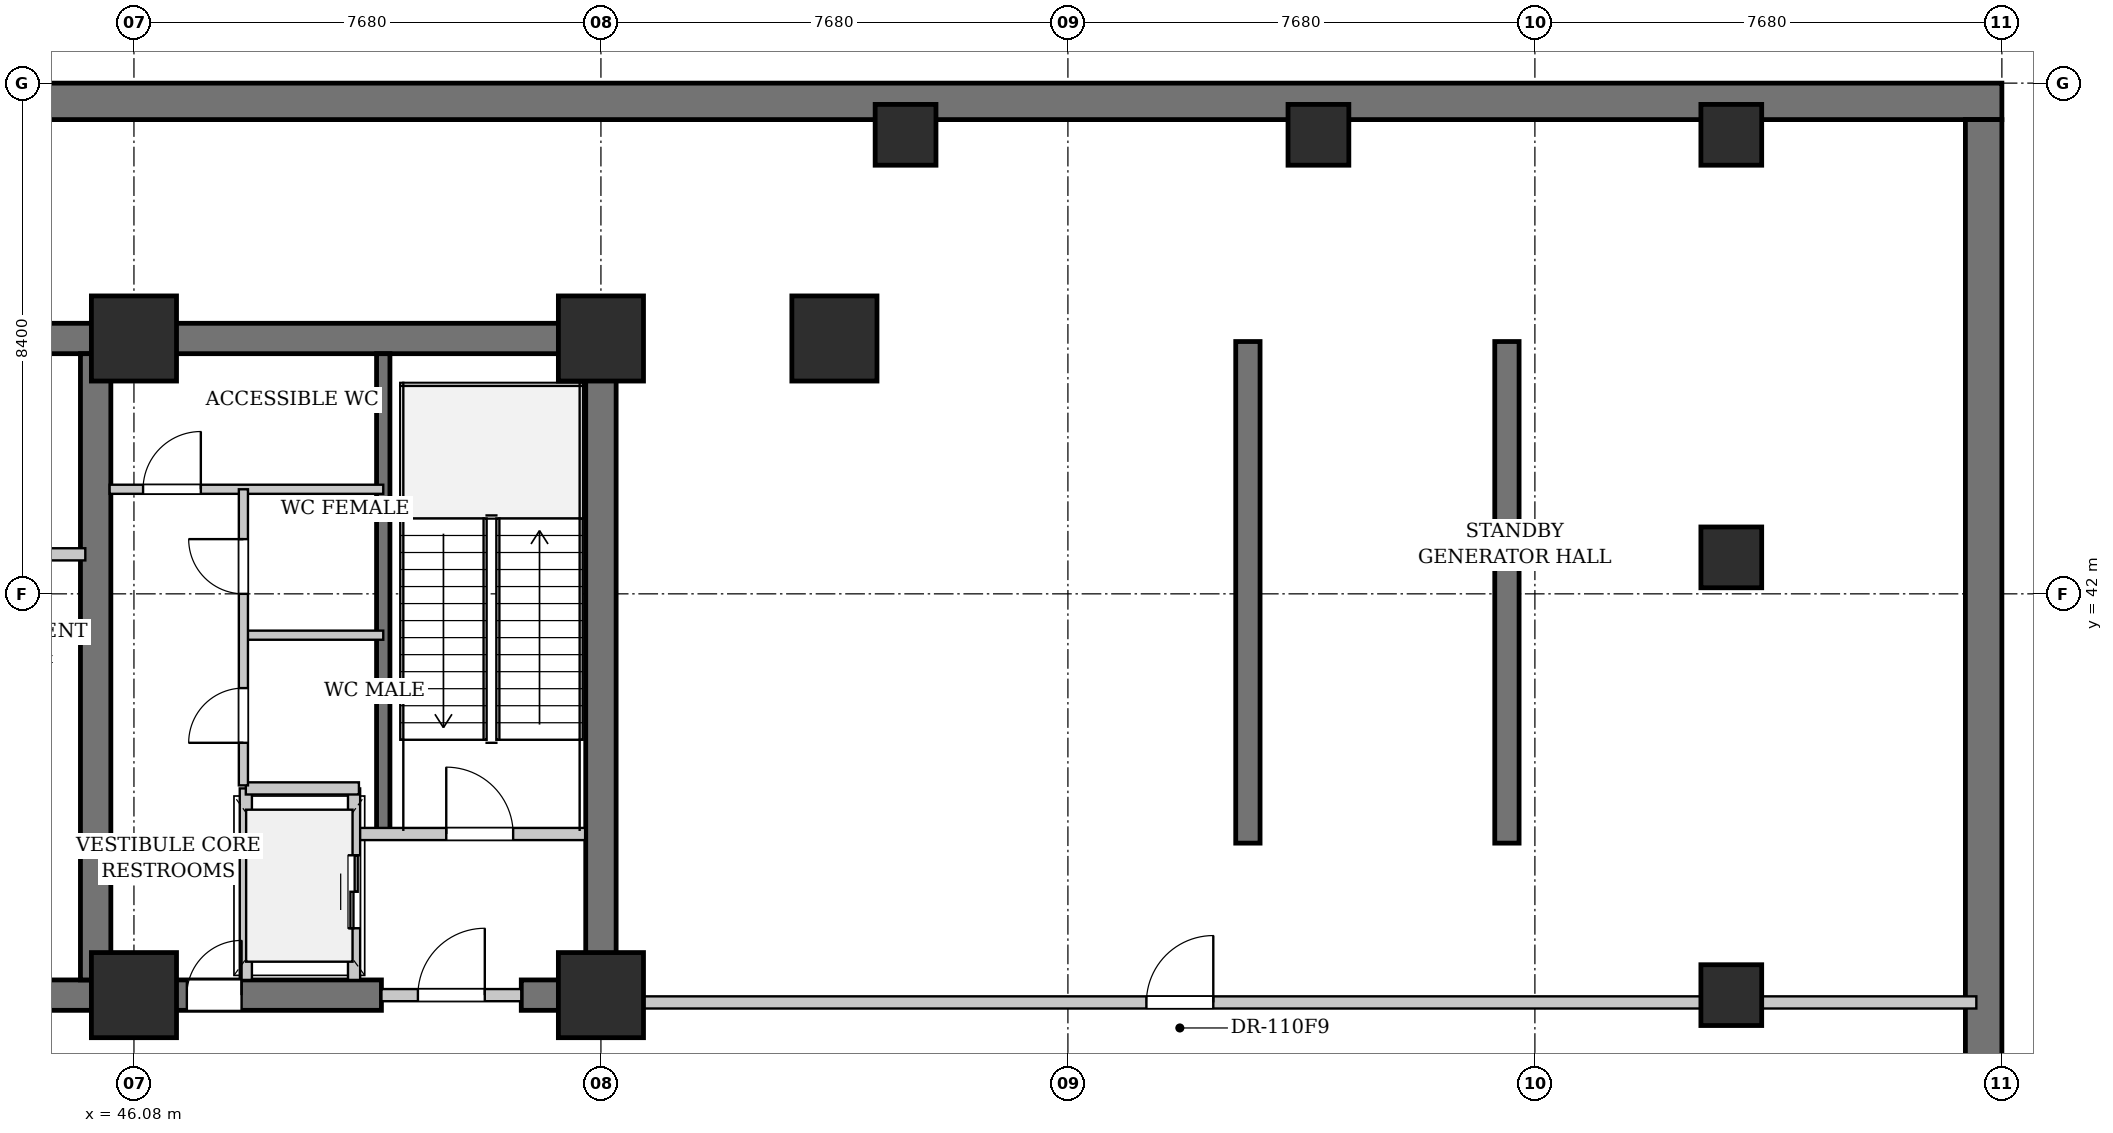
"""IFC4 building model, lengths in metres.
Left out: names, types, materials, properties, quantities, classifications, styles, units other than length and angle.
Written with IfcOpenShell. Run it as: python <this file> out.ifc"""

import sys

from ifc_helpers import new_model, si_unit, direction, frame, frame_2d, origin, origin_2d, place, context, subcontext, project, spatial, rectangle, extrude, element, fill, save


model = new_model("IFC4")
c1 = context("Model", 3, precision=1e-05, world=origin(), true_north=direction((0.0, 1.0)))
c2 = subcontext(c1, "Body", "Model", "MODEL_VIEW")
j1 = project(units=[si_unit("LENGTHUNIT", "METRE"), si_unit("PLANEANGLEUNIT", "RADIAN")], contexts=[c1])
p1 = place(None, origin())
s1 = spatial("IfcSite", under=j1, at=p1, CompositionType="ELEMENT")
p2 = place(p1, origin())
s2 = spatial("IfcBuilding", under=s1, at=p2, CompositionType="ELEMENT")
p3 = place(p2, frame((0.0, 0.0, -10.0)))
s3 = spatial("IfcBuildingStorey", under=s2, at=p3, CompositionType="ELEMENT", Elevation=-10.0)
p4 = place(p3, frame((0.0, 50.1, 0.0), z_axis=(0.0, 0.0, 1.0), x_axis=(1.0, 0.0, 0.0)))
e1 = element("IfcWall", 1, at=p4, inside=s3, PredefinedType="USERDEFINED", context=c2, shape_type="SweptSolid", body=[
    extrude(rectangle(XDim=76.8, YDim=0.6, at=frame_2d((38.4, 0.0))), origin(), (0.0, 0.0, 1.0), 4.65),
])
p5 = place(p3, frame((76.5, 0.6, 0.0), z_axis=(0.0, 0.0, 1.0), x_axis=(0.0, 1.0, 0.0)))
e2 = element("IfcWall", 2, at=p5, inside=s3, PredefinedType="USERDEFINED", context=c2, shape_type="SweptSolid", body=[
    extrude(rectangle(XDim=49.2, YDim=0.6, at=frame_2d((24.6, 0.0))), origin(), (0.0, 0.0, 1.0), 4.65),
])
p6 = place(p3, frame((22.79, 46.2, 0.0), z_axis=(0.0, 0.0, 1.0), x_axis=(1.0, 0.0, 0.0)))
e3 = element("IfcWall", 3, at=p6, inside=s3, PredefinedType="SHEAR", context=c2, shape_type="SweptSolid", body=[
    extrude(rectangle(XDim=31.22, YDim=0.5, at=frame_2d((15.61, 0.0))), origin(), (0.0, 0.0, 1.0), 4.65),
])
p7 = place(p3, frame((42.1, 35.4, 0.0), z_axis=(0.0, 0.0, 1.0), x_axis=(1.0, 0.0, 0.0)))
e4 = element("IfcWall", 4, at=p7, inside=s3, PredefinedType="SHEAR", context=c2, shape_type="SweptSolid", body=[
    extrude(rectangle(XDim=8.05, YDim=0.5, at=frame_2d((4.025, 0.0))), origin(), (0.0, 0.0, 1.0), 4.65),
])
p8 = place(p7, frame((4.85, 0.0, 0.0)))
e5 = element("IfcOpeningElement", 5, at=p8, cuts=e4, PredefinedType="OPENING", context=c2, shape_type="SweptSolid", body=[
    extrude(rectangle(XDim=0.9, YDim=2.15, at=frame_2d((0.45, 1.075))), frame((0.0, 0.26, 0.0), z_axis=(0.0, -1.0, 0.0), x_axis=(1.0, 0.0, 0.0)), (0.0, 0.0, 1.0), 0.52),
])
p9 = place(p3, frame((52.45, 35.4, 0.0), z_axis=(0.0, 0.0, 1.0), x_axis=(1.0, 0.0, 0.0)))
e6 = element("IfcWall", 6, at=p9, inside=s3, PredefinedType="SHEAR", context=c2, shape_type="SweptSolid", body=[
    extrude(rectangle(XDim=1.56, YDim=0.5, at=frame_2d((0.78, 0.0))), origin(), (0.0, 0.0, 1.0), 4.65),
])
for number, where, z_axis, x_axis in (
    (7, (45.45, 35.65, 0.0), (0.0, 0.0, 1.0), (0.0, 1.0, 0.0)),
    (8, (53.76, 35.65, 0.0), (0.0, 0.0, 1.0), (0.0, 1.0, 0.0)),
):
    element("IfcWall", number, at=place(p3, frame(where, z_axis=z_axis, x_axis=x_axis)), inside=s3, PredefinedType="SHEAR", context=c2, shape_type="SweptSolid", body=[
        extrude(rectangle(XDim=10.3, YDim=0.5, at=frame_2d((5.15, 0.0))), origin(), (0.0, 0.0, 1.0), 4.65),
    ])
p10 = place(p3, frame((50.18, 38.05, 0.0), z_axis=(0.0, 0.0, 1.0), x_axis=(0.0, 1.0, 0.0)))
e9 = element("IfcWall", 9, at=p10, inside=s3, PredefinedType="SHEAR", context=c2, shape_type="SweptSolid", body=[
    extrude(rectangle(XDim=7.9, YDim=0.22, at=frame_2d((3.95, 0.0))), origin(), (0.0, 0.0, 1.0), 4.65),
])
for number, where, z_axis, x_axis in (
    (10, (64.4, 37.9, 0.0), (0.0, 0.0, 1.0), (0.0, 1.0, 0.0)),
    (11, (68.66, 37.9, 0.0), (0.0, 0.0, 1.0), (0.0, 1.0, 0.0)),
):
    element("IfcWall", number, at=place(p3, frame(where, z_axis=z_axis, x_axis=x_axis)), inside=s3, PredefinedType="SHEAR", context=c2, shape_type="SweptSolid", body=[
        extrude(rectangle(XDim=8.25, YDim=0.4, at=frame_2d((4.125, 0.0))), origin(), (0.0, 0.0, 1.0), 4.65),
    ])
for number, where, z_axis, x_axis in (
    (12, (46.08, 35.4, 0.0), (0.0, 0.0, 1.0), (1.0, 0.0, 0.0)),
    (13, (46.08, 46.2, 0.0), (0.0, 0.0, 1.0), (1.0, 0.0, 0.0)),
    (14, (53.76, 35.4, 0.0), (0.0, 0.0, 1.0), (1.0, 0.0, 0.0)),
    (15, (53.76, 46.2, 0.0), (0.0, 0.0, 1.0), (1.0, 0.0, 0.0)),
    (16, (57.6, 46.2, 0.0), (0.0, 0.0, 1.0), (1.0, 0.0, 0.0)),
):
    element("IfcColumn", number, at=place(p3, frame(where, z_axis=z_axis, x_axis=x_axis)), inside=s3, PredefinedType="COLUMN", context=c2, shape_type="SweptSolid", body=[
        extrude(rectangle(XDim=1.4, YDim=1.4, at=origin_2d()), origin(), (0.0, 0.0, 1.0), 5.0),
    ])
for number, where, z_axis, x_axis in (
    (17, (58.77, 49.55, 0.0), (0.0, 0.0, 1.0), (1.0, 0.0, 0.0)),
    (18, (65.56, 49.55, 0.0), (0.0, 0.0, 1.0), (1.0, 0.0, 0.0)),
    (19, (72.35, 49.55, 0.0), (0.0, 0.0, 1.0), (1.0, 0.0, 0.0)),
    (20, (72.35, 35.4, 0.0), (0.0, 0.0, 1.0), (1.0, 0.0, 0.0)),
    (21, (72.35, 42.6, 0.0), (0.0, 0.0, 1.0), (1.0, 0.0, 0.0)),
):
    element("IfcColumn", number, at=place(p3, frame(where, z_axis=z_axis, x_axis=x_axis)), inside=s3, PredefinedType="COLUMN", context=c2, shape_type="SweptSolid", body=[
        extrude(rectangle(XDim=1.0, YDim=1.0, at=origin_2d()), origin(), (0.0, 0.0, 1.0), 5.0),
    ])
p11 = place(p3, frame((36.6, 42.65, 0.0), z_axis=(0.0, 0.0, 1.0), x_axis=(1.0, 0.0, 0.0)))
e22 = element("IfcWall", 22, at=p11, inside=s3, PredefinedType="PARTITIONING", context=c2, shape_type="SweptSolid", body=[
    extrude(rectangle(XDim=8.68, YDim=0.2, at=frame_2d((4.34, 0.0))), origin(), (0.0, 0.0, 1.0), 4.65),
])
p12 = place(p11, frame((2.4, 0.0, 0.0)))
e23 = element("IfcOpeningElement", 23, at=p12, cuts=e22, PredefinedType="OPENING", context=c2, shape_type="SweptSolid", body=[
    extrude(rectangle(XDim=0.9, YDim=2.15, at=frame_2d((0.45, 1.075))), frame((0.0, 0.11, 0.0), z_axis=(0.0, -1.0, 0.0), x_axis=(1.0, 0.0, 0.0)), (0.0, 0.0, 1.0), 0.22),
])
p13 = place(p3, frame((49.78, 38.05, 0.0), z_axis=(0.0, 0.0, 1.0), x_axis=(1.0, 0.0, 0.0)))
e24 = element("IfcWall", 24, at=p13, inside=s3, PredefinedType="PARTITIONING", context=c2, shape_type="SweptSolid", body=[
    extrude(rectangle(XDim=3.72, YDim=0.2, at=frame_2d((1.86, 0.0))), origin(), (0.0, 0.0, 1.0), 4.65),
])
p14 = place(p13, frame((1.436, 0.0, 0.0)))
e25 = element("IfcOpeningElement", 25, at=p14, cuts=e24, PredefinedType="OPENING", context=c2, shape_type="SweptSolid", body=[
    extrude(rectangle(XDim=1.1, YDim=2.15, at=frame_2d((0.55, 1.075))), frame((0.0, 0.11, 0.0), z_axis=(0.0, -1.0, 0.0), x_axis=(1.0, 0.0, 0.0)), (0.0, 0.0, 1.0), 0.22),
])
p15 = place(p3, frame((50.15, 35.4, 0.0), z_axis=(0.0, 0.0, 1.0), x_axis=(1.0, 0.0, 0.0)))
e26 = element("IfcWall", 26, at=p15, inside=s3, PredefinedType="PARTITIONING", context=c2, shape_type="SweptSolid", body=[
    extrude(rectangle(XDim=2.3, YDim=0.2, at=frame_2d((1.15, 0.0))), origin(), (0.0, 0.0, 1.0), 3.845),
])
p16 = place(p15, frame((0.6, 0.0, 0.0)))
e27 = element("IfcOpeningElement", 27, at=p16, cuts=e26, PredefinedType="OPENING", context=c2, shape_type="SweptSolid", body=[
    extrude(rectangle(XDim=1.1, YDim=2.15, at=frame_2d((0.55, 1.075))), frame((0.0, 0.11, 0.0), z_axis=(0.0, -1.0, 0.0), x_axis=(1.0, 0.0, 0.0)), (0.0, 0.0, 1.0), 0.22),
])
p17 = place(p3, frame((49.7, 35.65, 0.0), z_axis=(0.0, 0.0, 1.0), x_axis=(0.0, 1.0, 0.0)))
e28 = element("IfcWall", 28, at=p17, inside=s3, PredefinedType="PARTITIONING", context=c2, shape_type="SweptSolid", body=[
    extrude(rectangle(XDim=3.15, YDim=0.2, at=frame_2d((1.575, 0.0))), origin(), (0.0, 0.0, 1.0), 4.65),
])
p18 = place(p17, frame((0.85, 0.0, 0.0)))
e29 = element("IfcOpeningElement", 29, at=p18, cuts=e28, PredefinedType="OPENING", context=c2, shape_type="SweptSolid", body=[
    extrude(rectangle(XDim=1.2, YDim=2.2, at=frame_2d((0.6, 1.1))), frame((0.0, 0.11, 0.0), z_axis=(0.0, -1.0, 0.0), x_axis=(1.0, 0.0, 0.0)), (0.0, 0.0, 1.0), 0.22),
])
p19 = place(p3, frame((47.92, 35.65, 0.0), z_axis=(0.0, 0.0, 1.0), x_axis=(0.0, 1.0, 0.0)))
e30 = element("IfcWall", 30, at=p19, inside=s3, PredefinedType="PARTITIONING", context=c2, shape_type="SweptSolid", body=[
    extrude(rectangle(XDim=3.15, YDim=0.2, at=frame_2d((1.575, 0.0))), origin(), (0.0, 0.0, 1.0), 4.65),
])
p20 = place(p3, frame((47.92, 38.8, 0.0), z_axis=(0.0, 0.0, 1.0), x_axis=(1.0, 0.0, 0.0)))
e31 = element("IfcWall", 31, at=p20, inside=s3, PredefinedType="PARTITIONING", context=c2, shape_type="SweptSolid", body=[
    extrude(rectangle(XDim=1.86, YDim=0.2, at=frame_2d((0.93, 0.0))), origin(), (0.0, 0.0, 1.0), 4.65),
])
p21 = place(p3, frame((45.68, 43.72, 0.0), z_axis=(0.0, 0.0, 1.0), x_axis=(1.0, 0.0, 0.0)))
e32 = element("IfcWall", 32, at=p21, inside=s3, PredefinedType="PARTITIONING", context=c2, shape_type="SweptSolid", body=[
    extrude(rectangle(XDim=4.5, YDim=0.15, at=frame_2d((2.25, 0.0))), origin(), (0.0, 0.0, 1.0), 4.65),
])
p22 = place(p21, frame((0.55, 0.0, 0.0)))
e33 = element("IfcOpeningElement", 33, at=p22, cuts=e32, PredefinedType="OPENING", context=c2, shape_type="SweptSolid", body=[
    extrude(rectangle(XDim=0.95, YDim=2.15, at=frame_2d((0.475, 1.075))), frame((0.0, 0.085, 0.0), z_axis=(0.0, -1.0, 0.0), x_axis=(1.0, 0.0, 0.0)), (0.0, 0.0, 1.0), 0.17),
])
p23 = place(p3, frame((47.88, 41.32, 0.0), z_axis=(0.0, 0.0, 1.0), x_axis=(1.0, 0.0, 0.0)))
e34 = element("IfcWall", 34, at=p23, inside=s3, PredefinedType="PARTITIONING", context=c2, shape_type="SweptSolid", body=[
    extrude(rectangle(XDim=2.3, YDim=0.15, at=frame_2d((1.15, 0.0))), origin(), (0.0, 0.0, 1.0), 4.65),
])
p24 = place(p3, frame((47.88, 38.85, 0.0), z_axis=(0.0, 0.0, 1.0), x_axis=(0.0, 1.0, 0.0)))
e35 = element("IfcWall", 35, at=p24, inside=s3, PredefinedType="PARTITIONING", context=c2, shape_type="SweptSolid", body=[
    extrude(rectangle(XDim=4.87, YDim=0.15, at=frame_2d((2.435, 0.0))), origin(), (0.0, 0.0, 1.0), 4.65),
])
p25 = place(p24, frame((0.7, 0.0, 0.0)))
e36 = element("IfcOpeningElement", 36, at=p25, cuts=e35, PredefinedType="OPENING", context=c2, shape_type="SweptSolid", body=[
    extrude(rectangle(XDim=0.9, YDim=2.15, at=frame_2d((0.45, 1.075))), frame((0.0, 0.085, 0.0), z_axis=(0.0, -1.0, 0.0), x_axis=(1.0, 0.0, 0.0)), (0.0, 0.0, 1.0), 0.17),
])
p26 = place(p24, frame((3.15, 0.0, 0.0)))
e37 = element("IfcOpeningElement", 37, at=p26, cuts=e35, PredefinedType="OPENING", context=c2, shape_type="SweptSolid", body=[
    extrude(rectangle(XDim=0.9, YDim=2.15, at=frame_2d((0.45, 1.075))), frame((0.0, 0.085, 0.0), z_axis=(0.0, -1.0, 0.0), x_axis=(1.0, 0.0, 0.0)), (0.0, 0.0, 1.0), 0.17),
])
p27 = place(p3, frame((54.05, 35.28, 0.0), z_axis=(0.0, 0.0, 1.0), x_axis=(1.0, 0.0, 0.0)))
e38 = element("IfcWall", 38, at=p27, inside=s3, PredefinedType="PARTITIONING", context=c2, shape_type="SweptSolid", body=[
    extrude(rectangle(XDim=22.33, YDim=0.2, at=frame_2d((11.165, 0.0))), origin(), (0.0, 0.0, 1.0), 3.845),
])
p28 = place(p27, frame((8.681, 0.0, 0.0)))
e39 = element("IfcOpeningElement", 39, at=p28, cuts=e38, PredefinedType="OPENING", context=c2, shape_type="SweptSolid", body=[
    extrude(rectangle(XDim=1.1, YDim=2.15, at=frame_2d((0.55, 1.075))), frame((0.0, 0.11, 0.0), z_axis=(0.0, -1.0, 0.0), x_axis=(1.0, 0.0, 0.0)), (0.0, 0.0, 1.0), 0.22),
])
p29 = place(p14, origin())
e40 = element("IfcDoor", 40, at=p29, inside=s3, OperationType="SINGLE_SWING_LEFT", PredefinedType="DOOR", context=c2, shape_type="SweptSolid", body=[
    extrude(rectangle(XDim=1.1, YDim=2.15, at=frame_2d((0.55, 1.075))), frame((0.0, 0.025, 0.0), z_axis=(0.0, -1.0, 0.0), x_axis=(1.0, 0.0, 0.0)), (0.0, 0.0, 1.0), 0.05),
])
fill(e25, e40)
p30 = place(p16, origin())
e41 = element("IfcDoor", 41, at=p30, inside=s3, OperationType="SINGLE_SWING_RIGHT", PredefinedType="DOOR", context=c2, shape_type="SweptSolid", body=[
    extrude(rectangle(XDim=1.1, YDim=2.15, at=frame_2d((0.55, 1.075))), frame((0.0, 0.025, 0.0), z_axis=(0.0, -1.0, 0.0), x_axis=(1.0, 0.0, 0.0)), (0.0, 0.0, 1.0), 0.05),
])
fill(e27, e41)
p31 = place(p18, origin())
e42 = element("IfcDoor", 42, at=p31, inside=s3, OperationType="DOUBLE_DOOR_SLIDING", PredefinedType="DOOR", context=c2, shape_type="SweptSolid", body=[
    extrude(rectangle(XDim=1.2, YDim=2.2, at=frame_2d((0.6, 1.1))), frame((0.0, 0.025, 0.0), z_axis=(0.0, -1.0, 0.0), x_axis=(1.0, 0.0, 0.0)), (0.0, 0.0, 1.0), 0.05),
])
fill(e29, e42)
p32 = place(p22, origin())
e43 = element("IfcDoor", 43, at=p32, inside=s3, OperationType="SINGLE_SWING_RIGHT", PredefinedType="DOOR", context=c2, shape_type="SweptSolid", body=[
    extrude(rectangle(XDim=0.95, YDim=2.15, at=frame_2d((0.475, 1.075))), frame((0.0, 0.025, 0.0), z_axis=(0.0, -1.0, 0.0), x_axis=(1.0, 0.0, 0.0)), (0.0, 0.0, 1.0), 0.05),
])
fill(e33, e43)
p33 = place(p25, origin())
e44 = element("IfcDoor", 44, at=p33, inside=s3, OperationType="SINGLE_SWING_LEFT", PredefinedType="DOOR", context=c2, shape_type="SweptSolid", body=[
    extrude(rectangle(XDim=0.9, YDim=2.15, at=frame_2d((0.45, 1.075))), frame((0.0, 0.025, 0.0), z_axis=(0.0, -1.0, 0.0), x_axis=(1.0, 0.0, 0.0)), (0.0, 0.0, 1.0), 0.05),
])
fill(e36, e44)
p34 = place(p26, origin())
e45 = element("IfcDoor", 45, at=p34, inside=s3, OperationType="SINGLE_SWING_RIGHT", PredefinedType="DOOR", context=c2, shape_type="SweptSolid", body=[
    extrude(rectangle(XDim=0.9, YDim=2.15, at=frame_2d((0.45, 1.075))), frame((0.0, 0.025, 0.0), z_axis=(0.0, -1.0, 0.0), x_axis=(1.0, 0.0, 0.0)), (0.0, 0.0, 1.0), 0.05),
])
fill(e37, e45)
p35 = place(p28, origin())
e46 = element("IfcDoor", 46, at=p35, inside=s3, OperationType="SINGLE_SWING_RIGHT", PredefinedType="DOOR", context=c2, shape_type="SweptSolid", body=[
    extrude(rectangle(XDim=1.1, YDim=2.15, at=frame_2d((0.55, 1.075))), frame((0.0, 0.025, 0.0), z_axis=(0.0, -1.0, 0.0), x_axis=(1.0, 0.0, 0.0)), (0.0, 0.0, 1.0), 0.05),
])
fill(e39, e46)
p36 = place(p8, origin())
e47 = element("IfcDoor", 47, at=p36, inside=s3, OperationType="SINGLE_SWING_RIGHT", PredefinedType="DOOR", context=c2, shape_type="SweptSolid", body=[
    extrude(rectangle(XDim=0.9, YDim=2.15, at=frame_2d((0.45, 1.075))), frame((0.0, 0.025, 0.0), z_axis=(0.0, -1.0, 0.0), x_axis=(1.0, 0.0, 0.0)), (0.0, 0.0, 1.0), 0.05),
])
fill(e5, e47)
save(model, sys.argv[1])
